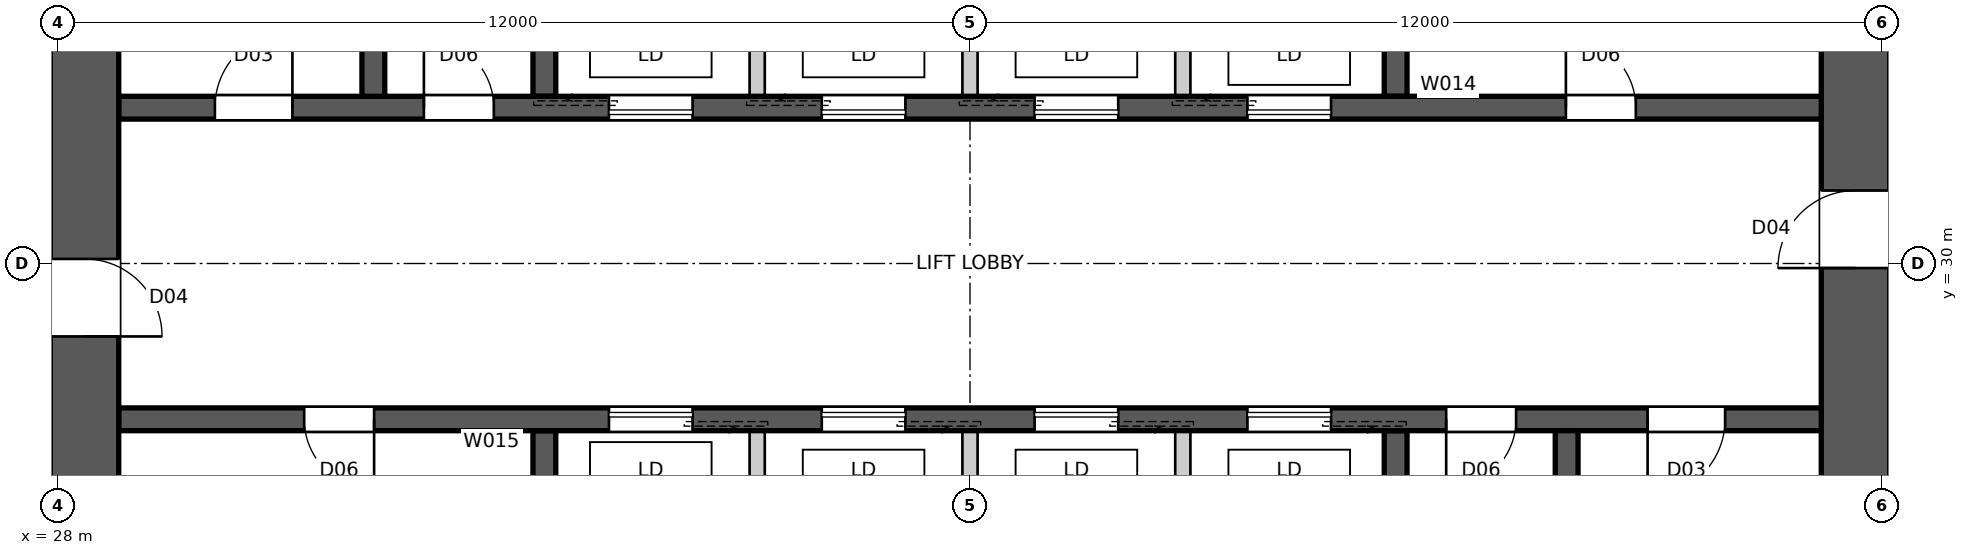
"""IFC4 building model, lengths in metres.
Left out: names, types, materials, properties, quantities, classifications, styles, units other than length and angle.
Written with IfcOpenShell. Run it as: python <this file> out.ifc"""

import sys

from ifc_helpers import new_model, si_unit, direction, frame, frame_2d, origin, place, context, subcontext, project, spatial, polyline, rectangle, outline, extrude, element, fill, save


model = new_model("IFC4")
c1 = context("Model", 3, precision=1e-05, world=origin(), true_north=direction((0.0, 1.0)))
c2 = subcontext(c1, "Body", "Model", "MODEL_VIEW")
j1 = project(units=[si_unit("LENGTHUNIT", "METRE"), si_unit("PLANEANGLEUNIT", "RADIAN")], contexts=[c1])
p1 = place(None, origin())
s1 = spatial("IfcSite", under=j1, at=p1, CompositionType="ELEMENT")
p2 = place(p1, origin())
s2 = spatial("IfcBuilding", under=s1, at=p2, CompositionType="ELEMENT")
p3 = place(p2, frame((0.0, 0.0, -7.4)))
s3 = spatial("IfcBuildingStorey", under=s2, at=p3, CompositionType="ELEMENT", Elevation=-7.4)
p4 = place(p3, frame((51.65, 18.8, -0.4), z_axis=(0.0, 0.0, 1.0), x_axis=(0.0, 1.0, 0.0)))
e1 = element("IfcWall", 1, at=p4, inside=s3, PredefinedType="SHEAR", context=c2, shape_type="SweptSolid", body=[
    extrude(outline(polyline([(0.0, -0.45), (22.4, -0.45), (22.4, -0.025), (22.85, -0.025), (22.85, 0.025), (22.4, 0.025), (22.4, 0.45), (0.0, 0.45), (0.0, 0.025), (-0.45, 0.025), (-0.45, -0.025), (0.0, -0.025), (0.0, -0.45)])), origin(), (0.0, 0.0, 1.0), 4.1),
])
p5 = place(p4, frame((11.14, 0.0, 0.4)))
e2 = element("IfcOpeningElement", 2, at=p5, cuts=e1, PredefinedType="OPENING", context=c2, shape_type="SweptSolid", body=[
    extrude(rectangle(XDim=1.02, YDim=2.4, at=frame_2d((0.51, 1.2))), frame((0.0, 0.46, 0.0), z_axis=(0.0, -1.0, 0.0), x_axis=(1.0, 0.0, 0.0)), (0.0, 0.0, 1.0), 0.92),
])
p6 = place(p3, frame((28.35, 41.2, -0.4), z_axis=(0.0, 0.0, 1.0), x_axis=(0.0, -1.0, 0.0)))
e3 = element("IfcWall", 3, at=p6, inside=s3, PredefinedType="SHEAR", context=c2, shape_type="SweptSolid", body=[
    extrude(outline(polyline([(0.0, -0.45), (22.4, -0.45), (22.4, -0.025), (22.85, -0.025), (22.85, 0.025), (22.4, 0.025), (22.4, 0.45), (0.0, 0.45), (0.0, 0.025), (-0.45, 0.025), (-0.45, -0.025), (0.0, -0.025), (0.0, -0.45)])), origin(), (0.0, 0.0, 1.0), 4.1),
])
p7 = place(p6, frame((11.14, 0.0, 0.4)))
e4 = element("IfcOpeningElement", 4, at=p7, cuts=e3, PredefinedType="OPENING", context=c2, shape_type="SweptSolid", body=[
    extrude(rectangle(XDim=1.02, YDim=2.4, at=frame_2d((0.51, 1.2))), frame((0.0, 0.46, 0.0), z_axis=(0.0, -1.0, 0.0), x_axis=(1.0, 0.0, 0.0)), (0.0, 0.0, 1.0), 0.92),
])
p8 = place(p3, frame((28.8, 32.05, -0.4), z_axis=(0.0, 0.0, 1.0), x_axis=(1.0, 0.0, 0.0)))
e5 = element("IfcWall", 5, at=p8, inside=s3, PredefinedType="SHEAR", context=c2, shape_type="SweptSolid", body=[
    extrude(rectangle(XDim=22.4, YDim=0.3, at=frame_2d((11.2, 0.0))), origin(), (0.0, 0.0, 1.0), 4.1),
])
p9 = place(p8, frame((19.04, 0.0, 0.4)))
e6 = element("IfcOpeningElement", 6, at=p9, cuts=e5, PredefinedType="OPENING", context=c2, shape_type="SweptSolid", body=[
    extrude(rectangle(XDim=0.92, YDim=2.1, at=frame_2d((0.46, 1.05))), frame((0.0, 0.16, 0.0), z_axis=(0.0, -1.0, 0.0), x_axis=(1.0, 0.0, 0.0)), (0.0, 0.0, 1.0), 0.32),
])
p10 = place(p8, frame((1.265, 0.0, 0.4)))
e7 = element("IfcOpeningElement", 7, at=p10, cuts=e5, PredefinedType="OPENING", context=c2, shape_type="SweptSolid", body=[
    extrude(rectangle(XDim=1.02, YDim=2.1, at=frame_2d((0.51, 1.05))), frame((0.0, 0.16, 0.0), z_axis=(0.0, -1.0, 0.0), x_axis=(1.0, 0.0, 0.0)), (0.0, 0.0, 1.0), 0.32),
])
p11 = place(p8, frame((4.015, 0.0, 0.4)))
e8 = element("IfcOpeningElement", 8, at=p11, cuts=e5, PredefinedType="OPENING", context=c2, shape_type="SweptSolid", body=[
    extrude(rectangle(XDim=0.92, YDim=2.1, at=frame_2d((0.46, 1.05))), frame((0.0, 0.16, 0.0), z_axis=(0.0, -1.0, 0.0), x_axis=(1.0, 0.0, 0.0)), (0.0, 0.0, 1.0), 0.32),
])
p12 = place(p8, frame((6.45, 0.0, 0.4)))
e9 = element("IfcOpeningElement", 9, at=p12, cuts=e5, PredefinedType="OPENING", context=c2, shape_type="SweptSolid", body=[
    extrude(rectangle(XDim=1.1, YDim=2.1, at=frame_2d((0.55, 1.05))), frame((0.0, 0.16, 0.0), z_axis=(0.0, -1.0, 0.0), x_axis=(1.0, 0.0, 0.0)), (0.0, 0.0, 1.0), 0.32),
])
p13 = place(p8, frame((9.25, 0.0, 0.4)))
e10 = element("IfcOpeningElement", 10, at=p13, cuts=e5, PredefinedType="OPENING", context=c2, shape_type="SweptSolid", body=[
    extrude(rectangle(XDim=1.1, YDim=2.1, at=frame_2d((0.55, 1.05))), frame((0.0, 0.16, 0.0), z_axis=(0.0, -1.0, 0.0), x_axis=(1.0, 0.0, 0.0)), (0.0, 0.0, 1.0), 0.32),
])
p14 = place(p8, frame((12.05, 0.0, 0.4)))
e11 = element("IfcOpeningElement", 11, at=p14, cuts=e5, PredefinedType="OPENING", context=c2, shape_type="SweptSolid", body=[
    extrude(rectangle(XDim=1.1, YDim=2.1, at=frame_2d((0.55, 1.05))), frame((0.0, 0.16, 0.0), z_axis=(0.0, -1.0, 0.0), x_axis=(1.0, 0.0, 0.0)), (0.0, 0.0, 1.0), 0.32),
])
p15 = place(p8, frame((14.85, 0.0, 0.4)))
e12 = element("IfcOpeningElement", 12, at=p15, cuts=e5, PredefinedType="OPENING", context=c2, shape_type="SweptSolid", body=[
    extrude(rectangle(XDim=1.1, YDim=2.1, at=frame_2d((0.55, 1.05))), frame((0.0, 0.16, 0.0), z_axis=(0.0, -1.0, 0.0), x_axis=(1.0, 0.0, 0.0)), (0.0, 0.0, 1.0), 0.32),
])
p16 = place(p3, frame((51.2, 27.95, -0.4), z_axis=(0.0, 0.0, 1.0), x_axis=(-1.0, 0.0, 0.0)))
e13 = element("IfcWall", 13, at=p16, inside=s3, PredefinedType="SHEAR", context=c2, shape_type="SweptSolid", body=[
    extrude(rectangle(XDim=22.4, YDim=0.3, at=frame_2d((11.2, 0.0))), origin(), (0.0, 0.0, 1.0), 4.1),
])
p17 = place(p16, frame((19.04, 0.0, 0.4)))
e14 = element("IfcOpeningElement", 14, at=p17, cuts=e13, PredefinedType="OPENING", context=c2, shape_type="SweptSolid", body=[
    extrude(rectangle(XDim=0.92, YDim=2.1, at=frame_2d((0.46, 1.05))), frame((0.0, 0.16, 0.0), z_axis=(0.0, -1.0, 0.0), x_axis=(1.0, 0.0, 0.0)), (0.0, 0.0, 1.0), 0.32),
])
p18 = place(p16, frame((1.265, 0.0, 0.4)))
e15 = element("IfcOpeningElement", 15, at=p18, cuts=e13, PredefinedType="OPENING", context=c2, shape_type="SweptSolid", body=[
    extrude(rectangle(XDim=1.02, YDim=2.1, at=frame_2d((0.51, 1.05))), frame((0.0, 0.16, 0.0), z_axis=(0.0, -1.0, 0.0), x_axis=(1.0, 0.0, 0.0)), (0.0, 0.0, 1.0), 0.32),
])
p19 = place(p16, frame((4.015, 0.0, 0.4)))
e16 = element("IfcOpeningElement", 16, at=p19, cuts=e13, PredefinedType="OPENING", context=c2, shape_type="SweptSolid", body=[
    extrude(rectangle(XDim=0.92, YDim=2.1, at=frame_2d((0.46, 1.05))), frame((0.0, 0.16, 0.0), z_axis=(0.0, -1.0, 0.0), x_axis=(1.0, 0.0, 0.0)), (0.0, 0.0, 1.0), 0.32),
])
p20 = place(p16, frame((6.45, 0.0, 0.4)))
e17 = element("IfcOpeningElement", 17, at=p20, cuts=e13, PredefinedType="OPENING", context=c2, shape_type="SweptSolid", body=[
    extrude(rectangle(XDim=1.1, YDim=2.1, at=frame_2d((0.55, 1.05))), frame((0.0, 0.16, 0.0), z_axis=(0.0, -1.0, 0.0), x_axis=(1.0, 0.0, 0.0)), (0.0, 0.0, 1.0), 0.32),
])
p21 = place(p16, frame((9.25, 0.0, 0.4)))
e18 = element("IfcOpeningElement", 18, at=p21, cuts=e13, PredefinedType="OPENING", context=c2, shape_type="SweptSolid", body=[
    extrude(rectangle(XDim=1.1, YDim=2.1, at=frame_2d((0.55, 1.05))), frame((0.0, 0.16, 0.0), z_axis=(0.0, -1.0, 0.0), x_axis=(1.0, 0.0, 0.0)), (0.0, 0.0, 1.0), 0.32),
])
p22 = place(p16, frame((12.05, 0.0, 0.4)))
e19 = element("IfcOpeningElement", 19, at=p22, cuts=e13, PredefinedType="OPENING", context=c2, shape_type="SweptSolid", body=[
    extrude(rectangle(XDim=1.1, YDim=2.1, at=frame_2d((0.55, 1.05))), frame((0.0, 0.16, 0.0), z_axis=(0.0, -1.0, 0.0), x_axis=(1.0, 0.0, 0.0)), (0.0, 0.0, 1.0), 0.32),
])
p23 = place(p16, frame((14.85, 0.0, 0.4)))
e20 = element("IfcOpeningElement", 20, at=p23, cuts=e13, PredefinedType="OPENING", context=c2, shape_type="SweptSolid", body=[
    extrude(rectangle(XDim=1.1, YDim=2.1, at=frame_2d((0.55, 1.05))), frame((0.0, 0.16, 0.0), z_axis=(0.0, -1.0, 0.0), x_axis=(1.0, 0.0, 0.0)), (0.0, 0.0, 1.0), 0.32),
])
for number, where, z_axis, x_axis in (
    (21, (34.4, 32.2, -0.4), (0.0, 0.0, 1.0), (0.0, 1.0, 0.0)),
    (22, (45.6, 27.8, -0.4), (0.0, 0.0, 1.0), (0.0, -1.0, 0.0)),
):
    element("IfcWall", number, at=place(p3, frame(where, z_axis=z_axis, x_axis=x_axis)), inside=s3, PredefinedType="SHEAR", context=c2, shape_type="SweptSolid", body=[
        extrude(rectangle(XDim=2.8, YDim=0.3, at=frame_2d((1.4, 0.0))), origin(), (0.0, 0.0, 1.0), 4.1),
    ])
for number, where, z_axis, x_axis in (
    (23, (37.2, 32.2, -0.4), (0.0, 0.0, 1.0), (0.0, 1.0, 0.0)),
    (24, (42.8, 27.8, -0.4), (0.0, 0.0, 1.0), (0.0, -1.0, 0.0)),
    (25, (40.0, 32.2, -0.4), (0.0, 0.0, 1.0), (0.0, 1.0, 0.0)),
    (26, (40.0, 27.8, -0.4), (0.0, 0.0, 1.0), (0.0, -1.0, 0.0)),
    (27, (42.8, 32.2, -0.4), (0.0, 0.0, 1.0), (0.0, 1.0, 0.0)),
    (28, (37.2, 27.8, -0.4), (0.0, 0.0, 1.0), (0.0, -1.0, 0.0)),
):
    element("IfcWall", number, at=place(p3, frame(where, z_axis=z_axis, x_axis=x_axis)), inside=s3, PredefinedType="SOLIDWALL", context=c2, shape_type="SweptSolid", body=[
        extrude(rectangle(XDim=2.8, YDim=0.2, at=frame_2d((1.4, 0.0))), origin(), (0.0, 0.0, 1.0), 4.1),
    ])
for number, where, z_axis, x_axis in (
    (29, (45.6, 32.2, -0.4), (0.0, 0.0, 1.0), (0.0, 1.0, 0.0)),
    (30, (34.4, 27.8, -0.4), (0.0, 0.0, 1.0), (0.0, -1.0, 0.0)),
):
    element("IfcWall", number, at=place(p3, frame(where, z_axis=z_axis, x_axis=x_axis)), inside=s3, PredefinedType="SHEAR", context=c2, shape_type="SweptSolid", body=[
        extrude(rectangle(XDim=2.8, YDim=0.3, at=frame_2d((1.4, 0.0))), origin(), (0.0, 0.0, 1.0), 4.1),
    ])
for number, where, z_axis, x_axis in (
    (31, (32.15, 32.2, -0.4), (0.0, 0.0, 1.0), (0.0, 1.0, 0.0)),
    (32, (47.85, 27.8, -0.4), (0.0, 0.0, 1.0), (0.0, -1.0, 0.0)),
):
    element("IfcWall", number, at=place(p3, frame(where, z_axis=z_axis, x_axis=x_axis)), inside=s3, PredefinedType="SHEAR", context=c2, shape_type="SweptSolid", body=[
        extrude(rectangle(XDim=7.7, YDim=0.3, at=frame_2d((3.85, 0.0))), origin(), (0.0, 0.0, 1.0), 4.1),
    ])
p24 = place(p9, origin())
e33 = element("IfcDoor", 33, at=p24, inside=s3, OperationType="SINGLE_SWING_LEFT", PredefinedType="DOOR", context=c2, shape_type="SweptSolid", body=[
    extrude(rectangle(XDim=0.92, YDim=2.1, at=frame_2d((0.46, 1.05))), frame((0.0, 0.025, 0.0), z_axis=(0.0, -1.0, 0.0), x_axis=(1.0, 0.0, 0.0)), (0.0, 0.0, 1.0), 0.05),
])
fill(e6, e33)
p25 = place(p17, origin())
e34 = element("IfcDoor", 34, at=p25, inside=s3, OperationType="SINGLE_SWING_LEFT", PredefinedType="DOOR", context=c2, shape_type="SweptSolid", body=[
    extrude(rectangle(XDim=0.92, YDim=2.1, at=frame_2d((0.46, 1.05))), frame((0.0, 0.025, 0.0), z_axis=(0.0, -1.0, 0.0), x_axis=(1.0, 0.0, 0.0)), (0.0, 0.0, 1.0), 0.05),
])
fill(e14, e34)
p26 = place(p18, origin())
e35 = element("IfcDoor", 35, at=p26, inside=s3, OperationType="SINGLE_SWING_RIGHT", PredefinedType="DOOR", context=c2, shape_type="SweptSolid", body=[
    extrude(rectangle(XDim=1.02, YDim=2.1, at=frame_2d((0.51, 1.05))), frame((0.0, 0.025, 0.0), z_axis=(0.0, -1.0, 0.0), x_axis=(1.0, 0.0, 0.0)), (0.0, 0.0, 1.0), 0.05),
])
fill(e15, e35)
p27 = place(p10, origin())
e36 = element("IfcDoor", 36, at=p27, inside=s3, OperationType="SINGLE_SWING_RIGHT", PredefinedType="DOOR", context=c2, shape_type="SweptSolid", body=[
    extrude(rectangle(XDim=1.02, YDim=2.1, at=frame_2d((0.51, 1.05))), frame((0.0, 0.025, 0.0), z_axis=(0.0, -1.0, 0.0), x_axis=(1.0, 0.0, 0.0)), (0.0, 0.0, 1.0), 0.05),
])
fill(e7, e36)
p28 = place(p11, origin())
e37 = element("IfcDoor", 37, at=p28, inside=s3, OperationType="SINGLE_SWING_LEFT", PredefinedType="DOOR", context=c2, shape_type="SweptSolid", body=[
    extrude(rectangle(XDim=0.92, YDim=2.1, at=frame_2d((0.46, 1.05))), frame((0.0, 0.025, 0.0), z_axis=(0.0, -1.0, 0.0), x_axis=(1.0, 0.0, 0.0)), (0.0, 0.0, 1.0), 0.05),
])
fill(e8, e37)
p29 = place(p19, origin())
e38 = element("IfcDoor", 38, at=p29, inside=s3, OperationType="SINGLE_SWING_RIGHT", PredefinedType="DOOR", context=c2, shape_type="SweptSolid", body=[
    extrude(rectangle(XDim=0.92, YDim=2.1, at=frame_2d((0.46, 1.05))), frame((0.0, 0.025, 0.0), z_axis=(0.0, -1.0, 0.0), x_axis=(1.0, 0.0, 0.0)), (0.0, 0.0, 1.0), 0.05),
])
fill(e16, e38)
p30 = place(p5, origin())
e39 = element("IfcDoor", 39, at=p30, inside=s3, OperationType="SINGLE_SWING_LEFT", PredefinedType="DOOR", context=c2, shape_type="SweptSolid", body=[
    extrude(rectangle(XDim=1.02, YDim=2.4, at=frame_2d((0.51, 1.2))), frame((0.0, 0.025, 0.0), z_axis=(0.0, -1.0, 0.0), x_axis=(1.0, 0.0, 0.0)), (0.0, 0.0, 1.0), 0.05),
])
fill(e2, e39)
p31 = place(p7, origin())
e40 = element("IfcDoor", 40, at=p31, inside=s3, OperationType="SINGLE_SWING_RIGHT", PredefinedType="DOOR", context=c2, shape_type="SweptSolid", body=[
    extrude(rectangle(XDim=1.02, YDim=2.4, at=frame_2d((0.51, 1.2))), frame((0.0, 0.025, 0.0), z_axis=(0.0, -1.0, 0.0), x_axis=(1.0, 0.0, 0.0)), (0.0, 0.0, 1.0), 0.05),
])
fill(e4, e40)
p32 = place(p12, origin())
e41 = element("IfcDoor", 41, at=p32, inside=s3, OperationType="SLIDING_TO_LEFT", PredefinedType="DOOR", context=c2, shape_type="SweptSolid", body=[
    extrude(rectangle(XDim=1.1, YDim=2.1, at=frame_2d((0.55, 1.05))), frame((0.0, 0.025, 0.0), z_axis=(0.0, -1.0, 0.0), x_axis=(1.0, 0.0, 0.0)), (0.0, 0.0, 1.0), 0.05),
])
fill(e9, e41)
p33 = place(p20, origin())
e42 = element("IfcDoor", 42, at=p33, inside=s3, OperationType="SLIDING_TO_LEFT", PredefinedType="DOOR", context=c2, shape_type="SweptSolid", body=[
    extrude(rectangle(XDim=1.1, YDim=2.1, at=frame_2d((0.55, 1.05))), frame((0.0, 0.025, 0.0), z_axis=(0.0, -1.0, 0.0), x_axis=(1.0, 0.0, 0.0)), (0.0, 0.0, 1.0), 0.05),
])
fill(e17, e42)
p34 = place(p13, origin())
e43 = element("IfcDoor", 43, at=p34, inside=s3, OperationType="SLIDING_TO_LEFT", PredefinedType="DOOR", context=c2, shape_type="SweptSolid", body=[
    extrude(rectangle(XDim=1.1, YDim=2.1, at=frame_2d((0.55, 1.05))), frame((0.0, 0.025, 0.0), z_axis=(0.0, -1.0, 0.0), x_axis=(1.0, 0.0, 0.0)), (0.0, 0.0, 1.0), 0.05),
])
fill(e10, e43)
p35 = place(p21, origin())
e44 = element("IfcDoor", 44, at=p35, inside=s3, OperationType="SLIDING_TO_LEFT", PredefinedType="DOOR", context=c2, shape_type="SweptSolid", body=[
    extrude(rectangle(XDim=1.1, YDim=2.1, at=frame_2d((0.55, 1.05))), frame((0.0, 0.025, 0.0), z_axis=(0.0, -1.0, 0.0), x_axis=(1.0, 0.0, 0.0)), (0.0, 0.0, 1.0), 0.05),
])
fill(e18, e44)
p36 = place(p14, origin())
e45 = element("IfcDoor", 45, at=p36, inside=s3, OperationType="SLIDING_TO_LEFT", PredefinedType="DOOR", context=c2, shape_type="SweptSolid", body=[
    extrude(rectangle(XDim=1.1, YDim=2.1, at=frame_2d((0.55, 1.05))), frame((0.0, 0.025, 0.0), z_axis=(0.0, -1.0, 0.0), x_axis=(1.0, 0.0, 0.0)), (0.0, 0.0, 1.0), 0.05),
])
fill(e11, e45)
p37 = place(p22, origin())
e46 = element("IfcDoor", 46, at=p37, inside=s3, OperationType="SLIDING_TO_LEFT", PredefinedType="DOOR", context=c2, shape_type="SweptSolid", body=[
    extrude(rectangle(XDim=1.1, YDim=2.1, at=frame_2d((0.55, 1.05))), frame((0.0, 0.025, 0.0), z_axis=(0.0, -1.0, 0.0), x_axis=(1.0, 0.0, 0.0)), (0.0, 0.0, 1.0), 0.05),
])
fill(e19, e46)
p38 = place(p15, origin())
e47 = element("IfcDoor", 47, at=p38, inside=s3, OperationType="SLIDING_TO_LEFT", PredefinedType="DOOR", context=c2, shape_type="SweptSolid", body=[
    extrude(rectangle(XDim=1.1, YDim=2.1, at=frame_2d((0.55, 1.05))), frame((0.0, 0.025, 0.0), z_axis=(0.0, -1.0, 0.0), x_axis=(1.0, 0.0, 0.0)), (0.0, 0.0, 1.0), 0.05),
])
fill(e12, e47)
p39 = place(p23, origin())
e48 = element("IfcDoor", 48, at=p39, inside=s3, OperationType="SLIDING_TO_LEFT", PredefinedType="DOOR", context=c2, shape_type="SweptSolid", body=[
    extrude(rectangle(XDim=1.1, YDim=2.1, at=frame_2d((0.55, 1.05))), frame((0.0, 0.025, 0.0), z_axis=(0.0, -1.0, 0.0), x_axis=(1.0, 0.0, 0.0)), (0.0, 0.0, 1.0), 0.05),
])
fill(e20, e48)
save(model, sys.argv[1])
